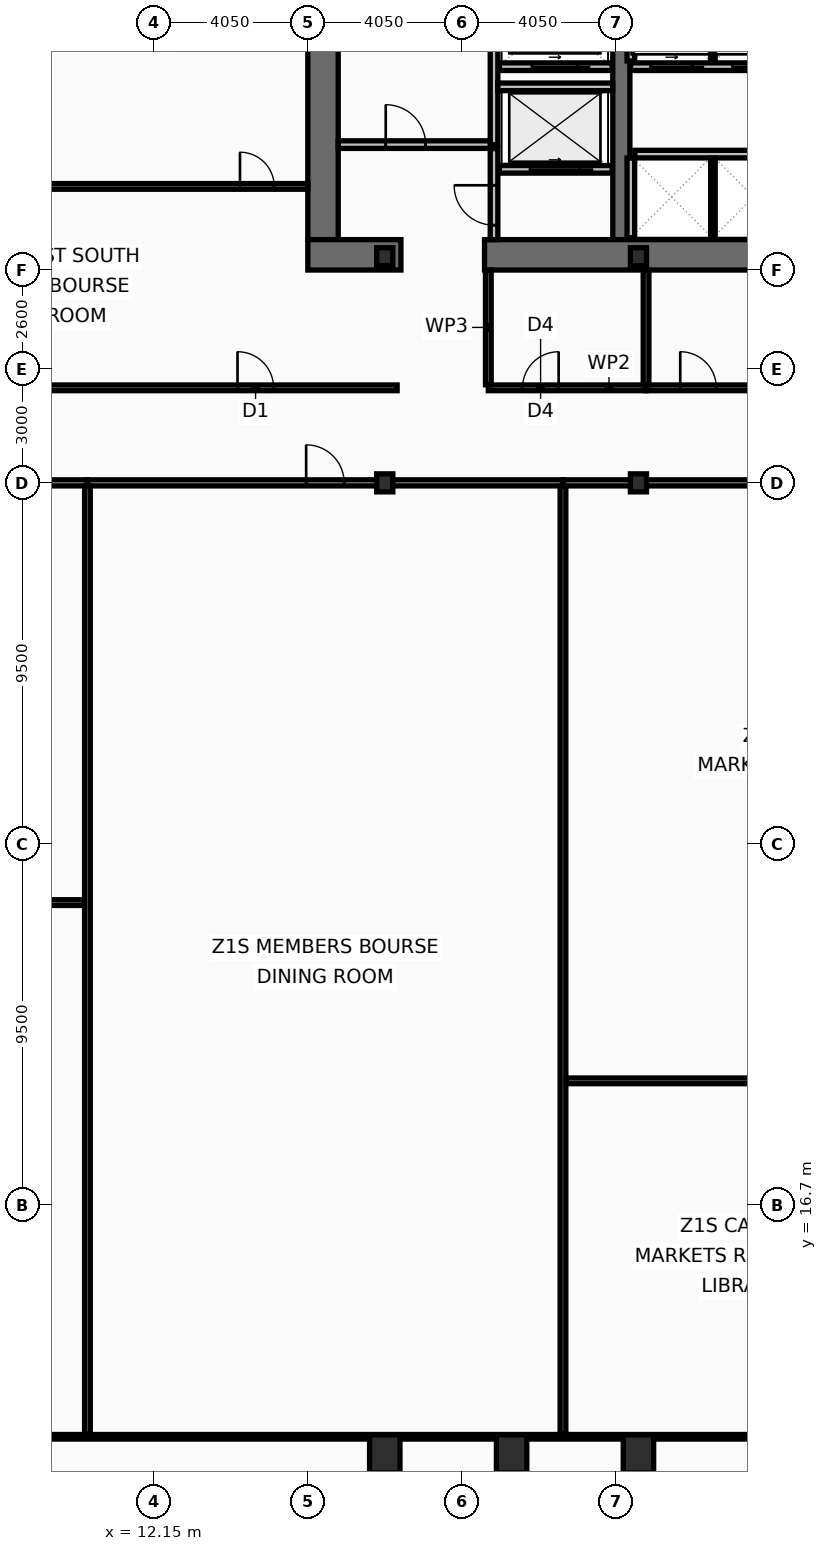
"""IFC4 building model, lengths in metres.
Left out: names, types, materials, properties, quantities, classifications, styles, units other than length and angle.
Written with IfcOpenShell. Run it as: python <this file> out.ifc"""

import sys

from ifc_helpers import new_model, si_unit, direction, frame, frame_2d, origin, origin_2d, place, context, subcontext, project, spatial, rectangle, hollow_rectangle, i_section, extrude, element, fill, save


model = new_model("IFC4")
c1 = context("Model", 3, precision=1e-05, world=origin(), true_north=direction((0.0, 1.0)))
c2 = subcontext(c1, "Body", "Model", "MODEL_VIEW")
j1 = project(units=[si_unit("LENGTHUNIT", "METRE"), si_unit("PLANEANGLEUNIT", "RADIAN")], contexts=[c1])
p1 = place(None, origin())
s1 = spatial("IfcSite", under=j1, at=p1, CompositionType="ELEMENT")
p2 = place(p1, origin())
s2 = spatial("IfcBuilding", under=s1, at=p2, CompositionType="ELEMENT")
p3 = place(p2, frame((0.0, 0.0, 49.8)))
s3 = spatial("IfcBuildingStorey", under=s2, at=p3, CompositionType="ELEMENT", Elevation=49.8)
p4 = place(p3, frame((16.6, 42.1, 0.0), z_axis=(0.0, 0.0, 1.0), x_axis=(0.0, 1.0, 0.0)))
e1 = element("IfcWall", 1, at=p4, inside=s3, PredefinedType="SHEAR", context=c2, shape_type="SweptSolid", body=[
    extrude(rectangle(XDim=10.8, YDim=0.8, at=frame_2d((5.4, 0.0))), origin(), (0.0, 0.0, 1.0), 3.82),
])
p5 = place(p3, frame((24.45, 42.1, 0.0), z_axis=(0.0, 0.0, 1.0), x_axis=(0.0, 1.0, 0.0)))
e2 = element("IfcWall", 2, at=p5, inside=s3, PredefinedType="SHEAR", context=c2, shape_type="SweptSolid", body=[
    extrude(rectangle(XDim=10.8, YDim=0.45, at=frame_2d((5.4, 0.0))), origin(), (0.0, 0.0, 1.0), 3.82),
])
p6 = place(p3, frame((18.65, 41.7, 0.0), z_axis=(0.0, 0.0, 1.0), x_axis=(-1.0, 0.0, 0.0)))
e3 = element("IfcWall", 3, at=p6, inside=s3, PredefinedType="SHEAR", context=c2, shape_type="SweptSolid", body=[
    extrude(rectangle(XDim=2.45, YDim=0.8, at=frame_2d((1.225, 0.0))), origin(), (0.0, 0.0, 1.0), 3.82),
])
p7 = place(p3, frame((32.3, 41.7, 0.0), z_axis=(0.0, 0.0, 1.0), x_axis=(-1.0, 0.0, 0.0)))
e4 = element("IfcWall", 4, at=p7, inside=s3, PredefinedType="SHEAR", context=c2, shape_type="SweptSolid", body=[
    extrude(rectangle(XDim=11.45, YDim=0.8, at=frame_2d((5.725, 0.0))), origin(), (0.0, 0.0, 1.0), 3.82),
])
for number, where, z_axis, x_axis in (
    (5, (18.225, 10.15, 0.0), (0.0, 0.0, 1.0), (1.0, 0.0, 0.0)),
    (6, (21.562, 10.15, 0.0), (0.0, 0.0, 1.0), (1.0, 0.0, 0.0)),
    (7, (24.9, 10.15, 0.0), (0.0, 0.0, 1.0), (1.0, 0.0, 0.0)),
):
    element("IfcColumn", number, at=place(p3, frame(where, z_axis=z_axis, x_axis=x_axis)), inside=s3, PredefinedType="COLUMN", context=c2, shape_type="SweptSolid", body=[
        extrude(hollow_rectangle(XDim=0.8, YDim=1.0, WallThickness=0.055, at=origin_2d()), origin(), (0.0, 0.0, 1.0), 4.0),
    ])
for number, where, z_axis, x_axis in (
    (8, (18.225, 35.7, 0.0), (0.0, 0.0, 1.0), (1.0, 0.0, 0.0)),
    (9, (18.225, 41.65, 0.0), (0.0, 0.0, 1.0), (1.0, 0.0, 0.0)),
    (10, (24.9, 35.7, 0.0), (0.0, 0.0, 1.0), (1.0, 0.0, 0.0)),
    (11, (24.9, 41.65, 0.0), (0.0, 0.0, 1.0), (1.0, 0.0, 0.0)),
):
    element("IfcColumn", number, at=place(p3, frame(where, z_axis=z_axis, x_axis=x_axis)), inside=s3, PredefinedType="COLUMN", context=c2, shape_type="SweptSolid", body=[
        extrude(i_section(OverallWidth=0.424, OverallDepth=0.474, WebThickness=0.048, FlangeThickness=0.077, at=origin_2d()), origin(), (0.0, 0.0, 1.0), 4.0),
    ])
p8 = place(p3, frame((24.21, 43.95, 0.0), z_axis=(0.0, 0.0, 1.0), x_axis=(-1.0, 0.0, 0.0)))
e12 = element("IfcWall", 12, at=p8, inside=s3, PredefinedType="PARTITIONING", context=c2, shape_type="SweptSolid", body=[
    extrude(rectangle(XDim=2.97, YDim=0.2, at=frame_2d((1.485, 0.0))), origin(), (0.0, 0.0, 1.0), 3.82),
])
p9 = place(p8, frame((0.86, 0.0, 0.0)))
e13 = element("IfcOpeningElement", 13, at=p9, cuts=e12, PredefinedType="OPENING", context=c2, shape_type="SweptSolid", body=[
    extrude(rectangle(XDim=1.3, YDim=2.18, at=frame_2d((0.65, 1.09))), frame((0.0, 0.11, 0.0), z_axis=(0.0, -1.0, 0.0), x_axis=(1.0, 0.0, 0.0)), (0.0, 0.0, 1.0), 0.22),
])
p10 = place(p3, frame((24.21, 46.65, 0.0), z_axis=(0.0, 0.0, 1.0), x_axis=(-1.0, 0.0, 0.0)))
e14 = element("IfcWall", 14, at=p10, inside=s3, PredefinedType="PARTITIONING", context=c2, shape_type="SweptSolid", body=[
    extrude(rectangle(XDim=2.97, YDim=0.2, at=frame_2d((1.485, 0.0))), origin(), (0.0, 0.0, 1.0), 3.82),
])
p11 = place(p10, frame((0.91, 0.0, 0.0)))
e15 = element("IfcOpeningElement", 15, at=p11, cuts=e14, PredefinedType="OPENING", context=c2, shape_type="SweptSolid", body=[
    extrude(rectangle(XDim=1.2, YDim=2.18, at=frame_2d((0.6, 1.09))), frame((0.0, 0.11, 0.0), z_axis=(0.0, -1.0, 0.0), x_axis=(1.0, 0.0, 0.0)), (0.0, 0.0, 1.0), 0.22),
])
p12 = place(p3, frame((31.22, 46.65, 0.0), z_axis=(0.0, 0.0, 1.0), x_axis=(-1.0, 0.0, 0.0)))
e16 = element("IfcWall", 16, at=p12, inside=s3, PredefinedType="PARTITIONING", context=c2, shape_type="SweptSolid", body=[
    extrude(rectangle(XDim=6.53, YDim=0.2, at=frame_2d((3.265, 0.0))), origin(), (0.0, 0.0, 1.0), 3.82),
])
p13 = place(p12, frame((4.9, 0.0, 0.0)))
e17 = element("IfcOpeningElement", 17, at=p13, cuts=e16, PredefinedType="OPENING", context=c2, shape_type="SweptSolid", body=[
    extrude(rectangle(XDim=1.1, YDim=2.18, at=frame_2d((0.55, 1.09))), frame((0.0, 0.11, 0.0), z_axis=(0.0, -1.0, 0.0), x_axis=(1.0, 0.0, 0.0)), (0.0, 0.0, 1.0), 0.22),
])
p14 = place(p12, frame((2.74, 0.0, 0.0)))
e18 = element("IfcOpeningElement", 18, at=p14, cuts=e16, PredefinedType="OPENING", context=c2, shape_type="SweptSolid", body=[
    extrude(rectangle(XDim=1.1, YDim=2.18, at=frame_2d((0.55, 1.09))), frame((0.0, 0.11, 0.0), z_axis=(0.0, -1.0, 0.0), x_axis=(1.0, 0.0, 0.0)), (0.0, 0.0, 1.0), 0.22),
])
p15 = place(p12, frame((0.58, 0.0, 0.0)))
e19 = element("IfcOpeningElement", 19, at=p15, cuts=e16, PredefinedType="OPENING", context=c2, shape_type="SweptSolid", body=[
    extrude(rectangle(XDim=1.1, YDim=2.18, at=frame_2d((0.55, 1.09))), frame((0.0, 0.11, 0.0), z_axis=(0.0, -1.0, 0.0), x_axis=(1.0, 0.0, 0.0)), (0.0, 0.0, 1.0), 0.22),
])
p16 = place(p3, frame((21.1, 44.6, 0.0), z_axis=(0.0, 0.0, 1.0), x_axis=(0.0, 1.0, 0.0)))
e20 = element("IfcWall", 20, at=p16, inside=s3, PredefinedType="PARTITIONING", context=c2, shape_type="SweptSolid", body=[
    extrude(rectangle(XDim=4.3, YDim=0.2, at=frame_2d((2.15, 0.0))), origin(), (0.0, 0.0, 1.0), 3.82),
])
p17 = place(p3, frame((17.0, 44.6, 0.0), z_axis=(0.0, 0.0, 1.0), x_axis=(1.0, 0.0, 0.0)))
e21 = element("IfcWall", 21, at=p17, inside=s3, PredefinedType="PARTITIONING", context=c2, shape_type="SweptSolid", body=[
    extrude(rectangle(XDim=4.0, YDim=0.2, at=frame_2d((2.0, 0.0))), origin(), (0.0, 0.0, 1.0), 3.82),
])
p18 = place(p17, frame((1.25, 0.0, 0.0)))
e22 = element("IfcOpeningElement", 22, at=p18, cuts=e21, PredefinedType="OPENING", context=c2, shape_type="SweptSolid", body=[
    extrude(rectangle(XDim=1.05, YDim=2.15, at=frame_2d((0.525, 1.075))), frame((0.0, 0.11, 0.0), z_axis=(0.0, -1.0, 0.0), x_axis=(1.0, 0.0, 0.0)), (0.0, 0.0, 1.0), 0.22),
])
p19 = place(p3, frame((21.2, 46.12, 0.0), z_axis=(0.0, 0.0, 1.0), x_axis=(1.0, 0.0, 0.0)))
e23 = element("IfcWall", 23, at=p19, inside=s3, PredefinedType="PARTITIONING", context=c2, shape_type="SweptSolid", body=[
    extrude(rectangle(XDim=3.02, YDim=0.2, at=frame_2d((1.51, 0.0))), origin(), (0.0, 0.0, 1.0), 3.82),
])
p20 = place(p3, frame((21.1, 42.1, 0.0), z_axis=(0.0, 0.0, 1.0), x_axis=(0.0, 1.0, 0.0)))
e24 = element("IfcWall", 24, at=p20, inside=s3, PredefinedType="PARTITIONING", context=c2, shape_type="SweptSolid", body=[
    extrude(rectangle(XDim=2.395, YDim=0.2, at=frame_2d((1.198, 0.0))), origin(), (0.0, 0.0, 1.0), 3.82),
])
p21 = place(p20, frame((0.38, 0.0, 0.0)))
e25 = element("IfcOpeningElement", 25, at=p21, cuts=e24, PredefinedType="OPENING", context=c2, shape_type="SweptSolid", body=[
    extrude(rectangle(XDim=1.05, YDim=2.15, at=frame_2d((0.525, 1.075))), frame((0.0, 0.11, 0.0), z_axis=(0.0, -1.0, 0.0), x_axis=(1.0, 0.0, 0.0)), (0.0, 0.0, 1.0), 0.22),
])
p22 = place(p3, frame((24.7, 46.8, 0.0), z_axis=(0.0, 0.0, 1.0), x_axis=(0.0, 1.0, 0.0)))
e26 = element("IfcWall", 26, at=p22, inside=s3, PredefinedType="PARTITIONING", context=c2, shape_type="SweptSolid", body=[
    extrude(rectangle(XDim=2.095, YDim=0.2, at=frame_2d((1.047, 0.0))), origin(), (0.0, 0.0, 1.0), 3.82),
])
p23 = place(p3, frame((26.86, 46.8, 0.0), z_axis=(0.0, 0.0, 1.0), x_axis=(0.0, 1.0, 0.0)))
e27 = element("IfcWall", 27, at=p23, inside=s3, PredefinedType="PARTITIONING", context=c2, shape_type="SweptSolid", body=[
    extrude(rectangle(XDim=2.095, YDim=0.12, at=frame_2d((1.047, 0.0))), origin(), (0.0, 0.0, 1.0), 3.82),
])
p24 = place(p3, frame((24.805, 44.35, 0.0), z_axis=(0.0, 0.0, 1.0), x_axis=(1.0, 0.0, 0.0)))
e28 = element("IfcWall", 28, at=p24, inside=s3, PredefinedType="PARTITIONING", context=c2, shape_type="SweptSolid", body=[
    extrude(rectangle(XDim=6.27, YDim=0.2, at=frame_2d((3.135, 0.0))), origin(), (0.0, 0.0, 1.0), 3.82),
])
p25 = place(p3, frame((24.7, 42.15, 0.0), z_axis=(0.0, 0.0, 1.0), x_axis=(0.0, 1.0, 0.0)))
e29 = element("IfcWall", 29, at=p25, inside=s3, PredefinedType="PARTITIONING", context=c2, shape_type="SweptSolid", body=[
    extrude(rectangle(XDim=2.095, YDim=0.2, at=frame_2d((1.048, 0.0))), origin(), (0.0, 0.0, 1.0), 3.82),
])
p26 = place(p3, frame((26.86, 42.15, 0.0), z_axis=(0.0, 0.0, 1.0), x_axis=(0.0, 1.0, 0.0)))
e30 = element("IfcWall", 30, at=p26, inside=s3, PredefinedType="PARTITIONING", context=c2, shape_type="SweptSolid", body=[
    extrude(rectangle(XDim=2.095, YDim=0.12, at=frame_2d((1.048, 0.0))), origin(), (0.0, 0.0, 1.0), 3.82),
])
p27 = place(p3, frame((20.95, 38.2, 0.0), z_axis=(0.0, 0.0, 1.0), x_axis=(1.0, 0.0, 0.0)))
e31 = element("IfcWall", 31, at=p27, inside=s3, PredefinedType="PARTITIONING", context=c2, shape_type="SweptSolid", body=[
    extrude(rectangle(XDim=4.15, YDim=0.15, at=frame_2d((2.075, 0.0))), origin(), (0.0, 0.0, 1.0), 3.01),
])
p28 = place(p27, frame((0.9, 0.0, 0.0)))
e32 = element("IfcOpeningElement", 32, at=p28, cuts=e31, PredefinedType="OPENING", context=c2, shape_type="SweptSolid", body=[
    extrude(rectangle(XDim=0.95, YDim=2.05, at=frame_2d((0.475, 1.025))), frame((0.0, 0.085, 0.0), z_axis=(0.0, -1.0, 0.0), x_axis=(1.0, 0.0, 0.0)), (0.0, 0.0, 1.0), 0.17),
])
p29 = place(p3, frame((25.1, 38.2, 0.0), z_axis=(0.0, 0.0, 1.0), x_axis=(1.0, 0.0, 0.0)))
e33 = element("IfcWall", 33, at=p29, inside=s3, PredefinedType="PARTITIONING", context=c2, shape_type="SweptSolid", body=[
    extrude(rectangle(XDim=3.7, YDim=0.15, at=frame_2d((1.85, 0.0))), origin(), (0.0, 0.0, 1.0), 3.01),
])
p30 = place(p29, frame((0.9, 0.0, 0.0)))
e34 = element("IfcOpeningElement", 34, at=p30, cuts=e33, PredefinedType="OPENING", context=c2, shape_type="SweptSolid", body=[
    extrude(rectangle(XDim=0.95, YDim=2.05, at=frame_2d((0.475, 1.025))), frame((0.0, 0.085, 0.0), z_axis=(0.0, -1.0, 0.0), x_axis=(1.0, 0.0, 0.0)), (0.0, 0.0, 1.0), 0.17),
])
p31 = place(p3, frame((20.95, 38.28, 0.0), z_axis=(0.0, 0.0, 1.0), x_axis=(0.0, 1.0, 0.0)))
e35 = element("IfcWall", 35, at=p31, inside=s3, PredefinedType="PARTITIONING", context=c2, shape_type="SweptSolid", body=[
    extrude(rectangle(XDim=3.02, YDim=0.15, at=frame_2d((1.51, 0.0))), origin(), (0.0, 0.0, 1.0), 3.82),
])
p32 = place(p3, frame((25.1, 38.28, 0.0), z_axis=(0.0, 0.0, 1.0), x_axis=(0.0, 1.0, 0.0)))
e36 = element("IfcWall", 36, at=p32, inside=s3, PredefinedType="PARTITIONING", context=c2, shape_type="SweptSolid", body=[
    extrude(rectangle(XDim=3.02, YDim=0.15, at=frame_2d((1.51, 0.0))), origin(), (0.0, 0.0, 1.0), 3.01),
])
p33 = place(p3, frame((2.03, 38.2, 0.0), z_axis=(0.0, 0.0, 1.0), x_axis=(1.0, 0.0, 0.0)))
e37 = element("IfcWall", 37, at=p33, inside=s3, PredefinedType="PARTITIONING", context=c2, shape_type="SweptSolid", body=[
    extrude(rectangle(XDim=16.52, YDim=0.15, at=frame_2d((8.26, 0.0))), origin(), (0.0, 0.0, 1.0), 3.01),
])
p34 = place(p33, frame((12.32, 0.0, 0.0)))
e38 = element("IfcOpeningElement", 38, at=p34, cuts=e37, PredefinedType="OPENING", context=c2, shape_type="SweptSolid", body=[
    extrude(rectangle(XDim=0.95, YDim=2.05, at=frame_2d((0.475, 1.025))), frame((0.0, 0.085, 0.0), z_axis=(0.0, -1.0, 0.0), x_axis=(1.0, 0.0, 0.0)), (0.0, 0.0, 1.0), 0.17),
])
p35 = place(p3, frame((2.095, 43.5, 0.0), z_axis=(0.0, 0.0, 1.0), x_axis=(1.0, 0.0, 0.0)))
e39 = element("IfcWall", 39, at=p35, inside=s3, PredefinedType="PARTITIONING", context=c2, shape_type="SweptSolid", body=[
    extrude(rectangle(XDim=14.105, YDim=0.15, at=frame_2d((7.052, 0.0))), origin(), (0.0, 0.0, 1.0), 3.01),
])
p36 = place(p35, frame((12.32, 0.0, 0.0)))
e40 = element("IfcOpeningElement", 40, at=p36, cuts=e39, PredefinedType="OPENING", context=c2, shape_type="SweptSolid", body=[
    extrude(rectangle(XDim=0.9, YDim=2.05, at=frame_2d((0.45, 1.025))), frame((0.0, 0.085, 0.0), z_axis=(0.0, -1.0, 0.0), x_axis=(1.0, 0.0, 0.0)), (0.0, 0.0, 1.0), 0.17),
])
p37 = place(p3, frame((2.03, 35.7, 0.0), z_axis=(0.0, 0.0, 1.0), x_axis=(1.0, 0.0, 0.0)))
e41 = element("IfcWall", 41, at=p37, inside=s3, PredefinedType="PARTITIONING", context=c2, shape_type="SweptSolid", body=[
    extrude(rectangle(XDim=8.37, YDim=0.16, at=frame_2d((4.185, 0.0))), origin(), (0.0, 0.0, 1.0), 3.01),
])
p38 = place(p37, frame((4.016, 0.0, 0.0)))
e42 = element("IfcOpeningElement", 42, at=p38, cuts=e41, PredefinedType="OPENING", context=c2, shape_type="SweptSolid", body=[
    extrude(rectangle(XDim=1.0, YDim=2.05, at=frame_2d((0.5, 1.025))), frame((0.0, 0.09, 0.0), z_axis=(0.0, -1.0, 0.0), x_axis=(1.0, 0.0, 0.0)), (0.0, 0.0, 1.0), 0.18),
])
p39 = place(p3, frame((2.095, 24.656, 0.0), z_axis=(0.0, 0.0, 1.0), x_axis=(1.0, 0.0, 0.0)))
e43 = element("IfcWall", 43, at=p39, inside=s3, PredefinedType="PARTITIONING", context=c2, shape_type="SweptSolid", body=[
    extrude(rectangle(XDim=8.225, YDim=0.15, at=frame_2d((4.113, 0.0))), origin(), (0.0, 0.0, 1.0), 3.82),
])
p40 = place(p39, frame((3.767, 0.0, 0.0)))
e44 = element("IfcOpeningElement", 44, at=p40, cuts=e43, PredefinedType="OPENING", context=c2, shape_type="SweptSolid", body=[
    extrude(rectangle(XDim=0.9, YDim=2.05, at=frame_2d((0.45, 1.025))), frame((0.0, 0.085, 0.0), z_axis=(0.0, -1.0, 0.0), x_axis=(1.0, 0.0, 0.0)), (0.0, 0.0, 1.0), 0.17),
])
p41 = place(p3, frame((10.4, 35.7, 0.0), z_axis=(0.0, 0.0, 1.0), x_axis=(1.0, 0.0, 0.0)))
e45 = element("IfcWall", 45, at=p41, inside=s3, PredefinedType="PARTITIONING", context=c2, shape_type="SweptSolid", body=[
    extrude(rectangle(XDim=12.514, YDim=0.16, at=frame_2d((6.257, 0.0))), origin(), (0.0, 0.0, 1.0), 3.01),
])
p42 = place(p41, frame((5.756, 0.0, 0.0)))
e46 = element("IfcOpeningElement", 46, at=p42, cuts=e45, PredefinedType="OPENING", context=c2, shape_type="SweptSolid", body=[
    extrude(rectangle(XDim=1.0, YDim=2.05, at=frame_2d((0.5, 1.025))), frame((0.0, 0.09, 0.0), z_axis=(0.0, -1.0, 0.0), x_axis=(1.0, 0.0, 0.0)), (0.0, 0.0, 1.0), 0.18),
])
p43 = place(p3, frame((10.4, 10.665, 0.0), z_axis=(0.0, 0.0, 1.0), x_axis=(0.0, 1.0, 0.0)))
e47 = element("IfcWall", 47, at=p43, inside=s3, PredefinedType="PARTITIONING", context=c2, shape_type="SweptSolid", body=[
    extrude(rectangle(XDim=24.95, YDim=0.15, at=frame_2d((12.475, 0.0))), origin(), (0.0, 0.0, 1.0), 3.01),
])
p44 = place(p3, frame((22.914, 35.7, 0.0), z_axis=(0.0, 0.0, 1.0), x_axis=(1.0, 0.0, 0.0)))
e48 = element("IfcWall", 48, at=p44, inside=s3, PredefinedType="PARTITIONING", context=c2, shape_type="SweptSolid", body=[
    extrude(rectangle(XDim=12.681, YDim=0.16, at=frame_2d((6.34, 0.0))), origin(), (0.0, 0.0, 1.0), 3.01),
])
p45 = place(p44, frame((5.826, 0.0, 0.0)))
e49 = element("IfcOpeningElement", 49, at=p45, cuts=e48, PredefinedType="OPENING", context=c2, shape_type="SweptSolid", body=[
    extrude(rectangle(XDim=1.0, YDim=2.05, at=frame_2d((0.5, 1.025))), frame((0.0, 0.09, 0.0), z_axis=(0.0, -1.0, 0.0), x_axis=(1.0, 0.0, 0.0)), (0.0, 0.0, 1.0), 0.18),
])
p46 = place(p3, frame((22.914, 10.665, 0.0), z_axis=(0.0, 0.0, 1.0), x_axis=(0.0, 1.0, 0.0)))
e50 = element("IfcWall", 50, at=p46, inside=s3, PredefinedType="PARTITIONING", context=c2, shape_type="SweptSolid", body=[
    extrude(rectangle(XDim=24.95, YDim=0.15, at=frame_2d((12.475, 0.0))), origin(), (0.0, 0.0, 1.0), 3.21),
])
p47 = place(p3, frame((22.994, 19.966, 0.0), z_axis=(0.0, 0.0, 1.0), x_axis=(1.0, 0.0, 0.0)))
e51 = element("IfcWall", 51, at=p47, inside=s3, PredefinedType="PARTITIONING", context=c2, shape_type="SweptSolid", body=[
    extrude(rectangle(XDim=12.521, YDim=0.15, at=frame_2d((6.26, 0.0))), origin(), (0.0, 0.0, 1.0), 3.01),
])
p48 = place(p47, frame((5.706, 0.0, 0.0)))
e52 = element("IfcOpeningElement", 52, at=p48, cuts=e51, PredefinedType="OPENING", context=c2, shape_type="SweptSolid", body=[
    extrude(rectangle(XDim=0.9, YDim=2.05, at=frame_2d((0.45, 1.025))), frame((0.0, 0.085, 0.0), z_axis=(0.0, -1.0, 0.0), x_axis=(1.0, 0.0, 0.0)), (0.0, 0.0, 1.0), 0.17),
])
p49 = place(p3, frame((2.095, 10.6, 0.0), z_axis=(0.0, 0.0, 1.0), x_axis=(1.0, 0.0, 0.0)))
e53 = element("IfcWall", 53, at=p49, inside=s3, PredefinedType="PARTITIONING", context=c2, shape_type="SweptSolid", body=[
    extrude(rectangle(XDim=68.71, YDim=0.12, at=frame_2d((34.355, 0.0))), origin(), (0.0, 0.0, 1.0), 3.01),
])
p50 = place(p9, origin())
e54 = element("IfcDoor", 54, at=p50, inside=s3, OperationType="SLIDING_TO_LEFT", PredefinedType="DOOR", context=c2, shape_type="SweptSolid", body=[
    extrude(rectangle(XDim=1.3, YDim=2.18, at=frame_2d((0.65, 1.09))), frame((0.0, 0.025, 0.0), z_axis=(0.0, -1.0, 0.0), x_axis=(1.0, 0.0, 0.0)), (0.0, 0.0, 1.0), 0.05),
])
fill(e13, e54)
p51 = place(p11, origin())
e55 = element("IfcDoor", 55, at=p51, inside=s3, OperationType="SLIDING_TO_LEFT", PredefinedType="DOOR", context=c2, shape_type="SweptSolid", body=[
    extrude(rectangle(XDim=1.2, YDim=2.18, at=frame_2d((0.6, 1.09))), frame((0.0, 0.025, 0.0), z_axis=(0.0, -1.0, 0.0), x_axis=(1.0, 0.0, 0.0)), (0.0, 0.0, 1.0), 0.05),
])
fill(e15, e55)
p52 = place(p13, origin())
e56 = element("IfcDoor", 56, at=p52, inside=s3, OperationType="SLIDING_TO_LEFT", PredefinedType="DOOR", context=c2, shape_type="SweptSolid", body=[
    extrude(rectangle(XDim=1.1, YDim=2.18, at=frame_2d((0.55, 1.09))), frame((0.0, 0.025, 0.0), z_axis=(0.0, -1.0, 0.0), x_axis=(1.0, 0.0, 0.0)), (0.0, 0.0, 1.0), 0.05),
])
fill(e17, e56)
p53 = place(p14, origin())
e57 = element("IfcDoor", 57, at=p53, inside=s3, OperationType="SLIDING_TO_LEFT", PredefinedType="DOOR", context=c2, shape_type="SweptSolid", body=[
    extrude(rectangle(XDim=1.1, YDim=2.18, at=frame_2d((0.55, 1.09))), frame((0.0, 0.025, 0.0), z_axis=(0.0, -1.0, 0.0), x_axis=(1.0, 0.0, 0.0)), (0.0, 0.0, 1.0), 0.05),
])
fill(e18, e57)
p54 = place(p18, origin())
e58 = element("IfcDoor", 58, at=p54, inside=s3, OperationType="SINGLE_SWING_LEFT", PredefinedType="DOOR", context=c2, shape_type="SweptSolid", body=[
    extrude(rectangle(XDim=1.05, YDim=2.15, at=frame_2d((0.525, 1.075))), frame((0.0, 0.025, 0.0), z_axis=(0.0, -1.0, 0.0), x_axis=(1.0, 0.0, 0.0)), (0.0, 0.0, 1.0), 0.05),
])
fill(e22, e58)
p55 = place(p21, origin())
e59 = element("IfcDoor", 59, at=p55, inside=s3, OperationType="SINGLE_SWING_RIGHT", PredefinedType="DOOR", context=c2, shape_type="SweptSolid", body=[
    extrude(rectangle(XDim=1.05, YDim=2.15, at=frame_2d((0.525, 1.075))), frame((0.0, 0.025, 0.0), z_axis=(0.0, -1.0, 0.0), x_axis=(1.0, 0.0, 0.0)), (0.0, 0.0, 1.0), 0.05),
])
fill(e25, e59)
p56 = place(p28, origin())
e60 = element("IfcDoor", 60, at=p56, inside=s3, OperationType="SINGLE_SWING_RIGHT", PredefinedType="DOOR", context=c2, shape_type="SweptSolid", body=[
    extrude(rectangle(XDim=0.95, YDim=2.05, at=frame_2d((0.475, 1.025))), frame((0.0, 0.025, 0.0), z_axis=(0.0, -1.0, 0.0), x_axis=(1.0, 0.0, 0.0)), (0.0, 0.0, 1.0), 0.05),
])
fill(e32, e60)
p57 = place(p30, origin())
e61 = element("IfcDoor", 61, at=p57, inside=s3, OperationType="SINGLE_SWING_LEFT", PredefinedType="DOOR", context=c2, shape_type="SweptSolid", body=[
    extrude(rectangle(XDim=0.95, YDim=2.05, at=frame_2d((0.475, 1.025))), frame((0.0, 0.025, 0.0), z_axis=(0.0, -1.0, 0.0), x_axis=(1.0, 0.0, 0.0)), (0.0, 0.0, 1.0), 0.05),
])
fill(e34, e61)
p58 = place(p34, origin())
e62 = element("IfcDoor", 62, at=p58, inside=s3, OperationType="SINGLE_SWING_LEFT", PredefinedType="DOOR", context=c2, shape_type="SweptSolid", body=[
    extrude(rectangle(XDim=0.95, YDim=2.05, at=frame_2d((0.475, 1.025))), frame((0.0, 0.025, 0.0), z_axis=(0.0, -1.0, 0.0), x_axis=(1.0, 0.0, 0.0)), (0.0, 0.0, 1.0), 0.05),
])
fill(e38, e62)
p59 = place(p36, origin())
e63 = element("IfcDoor", 63, at=p59, inside=s3, OperationType="SINGLE_SWING_LEFT", PredefinedType="DOOR", context=c2, shape_type="SweptSolid", body=[
    extrude(rectangle(XDim=0.9, YDim=2.05, at=frame_2d((0.45, 1.025))), frame((0.0, 0.025, 0.0), z_axis=(0.0, -1.0, 0.0), x_axis=(1.0, 0.0, 0.0)), (0.0, 0.0, 1.0), 0.05),
])
fill(e40, e63)
p60 = place(p42, origin())
e64 = element("IfcDoor", 64, at=p60, inside=s3, OperationType="SINGLE_SWING_LEFT", PredefinedType="DOOR", context=c2, shape_type="SweptSolid", body=[
    extrude(rectangle(XDim=1.0, YDim=2.05, at=frame_2d((0.5, 1.025))), frame((0.0, 0.025, 0.0), z_axis=(0.0, -1.0, 0.0), x_axis=(1.0, 0.0, 0.0)), (0.0, 0.0, 1.0), 0.05),
])
fill(e46, e64)
save(model, sys.argv[1])
